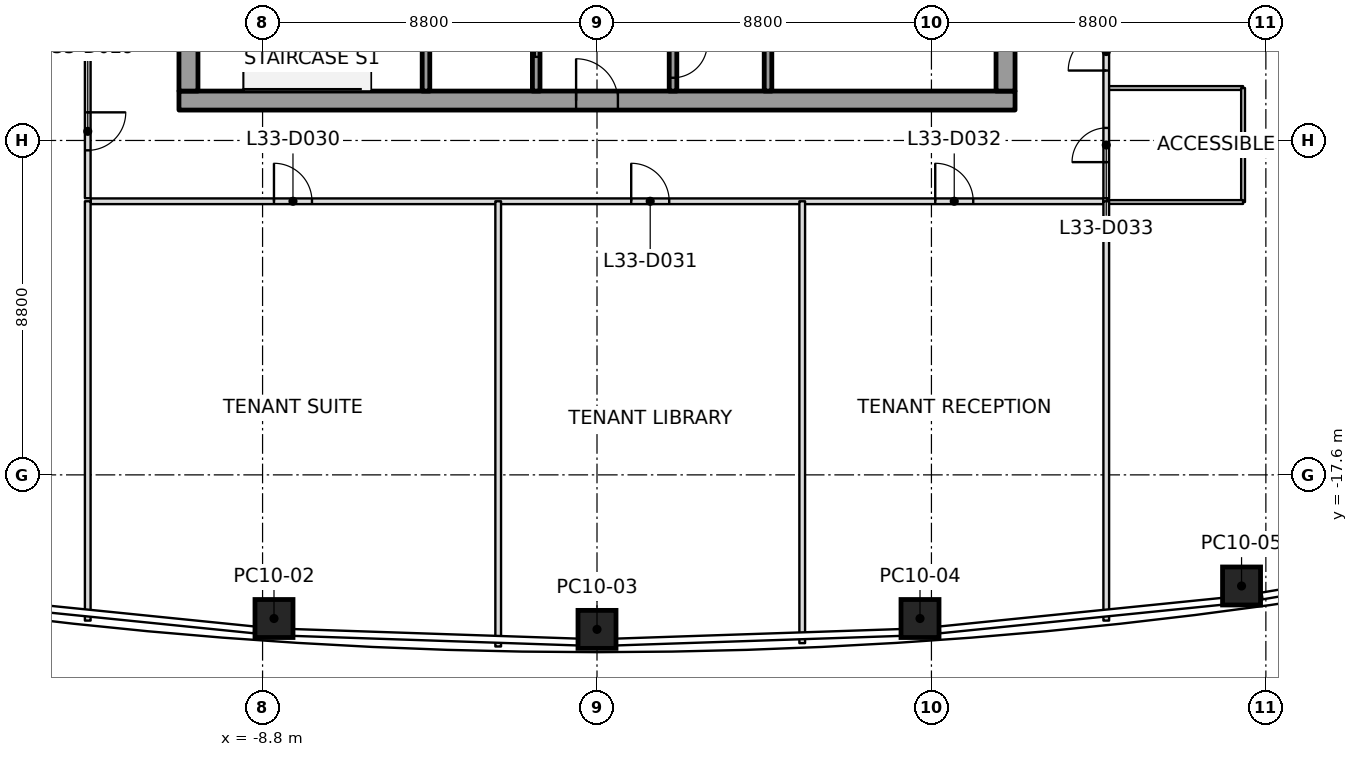
"""IFC4 building model, lengths in metres.
Left out: names, types, materials, properties, quantities, classifications, styles, units other than length and angle.
Written with IfcOpenShell. Run it as: python <this file> out.ifc"""

import sys

from ifc_helpers import new_model, si_unit, direction, frame, frame_2d, origin, origin_2d, place, context, subcontext, project, spatial, rectangle, extrude, element, fill, save


model = new_model("IFC4")
c1 = context("Model", 3, precision=1e-05, world=origin(), true_north=direction((0.0, 1.0)))
c2 = subcontext(c1, "Body", "Model", "MODEL_VIEW")
j1 = project(units=[si_unit("LENGTHUNIT", "METRE"), si_unit("PLANEANGLEUNIT", "RADIAN")], contexts=[c1])
p1 = place(None, origin())
s1 = spatial("IfcSite", under=j1, at=p1, CompositionType="ELEMENT")
p2 = place(p1, origin())
s2 = spatial("IfcBuilding", under=s1, at=p2, CompositionType="ELEMENT")
p3 = place(p2, frame((0.0, 0.0, 153.8)))
s3 = spatial("IfcBuildingStorey", under=s2, at=p3, CompositionType="ELEMENT", Elevation=153.8)
p4 = place(p3, frame((-8.499, -21.38, 0.0), z_axis=(0.008849199152, 0.01116829962, 0.999898475225), x_axis=(-0.997701725357, 0.0672756111, 0.008078327231)))
e1 = element("IfcColumn", 1, at=p4, inside=s3, PredefinedType="COLUMN", context=c2, shape_type="SweptSolid", body=[
    extrude(rectangle(XDim=1.0, YDim=1.0, at=origin_2d()), origin(), (0.0, 0.0, 1.0), 4.0),
])
p5 = place(p3, frame((0.0, -21.666, 0.0), z_axis=(0.0, 0.01141283087, 0.999934871525), x_axis=(1.0, 0.0, 0.0)))
e2 = element("IfcColumn", 2, at=p5, inside=s3, PredefinedType="COLUMN", context=c2, shape_type="SweptSolid", body=[
    extrude(rectangle(XDim=1.0, YDim=1.0, at=origin_2d()), origin(), (0.0, 0.0, 1.0), 4.0),
])
p6 = place(p3, frame((8.499, -21.38, 0.0), z_axis=(-0.008849199152, 0.01116829962, 0.999898475225), x_axis=(0.997701725357, 0.0672756111, 0.008078327231)))
e3 = element("IfcColumn", 3, at=p6, inside=s3, PredefinedType="COLUMN", context=c2, shape_type="SweptSolid", body=[
    extrude(rectangle(XDim=1.0, YDim=1.0, at=origin_2d()), origin(), (0.0, 0.0, 1.0), 4.0),
])
p7 = place(p3, frame((16.96, -20.524, 0.0), z_axis=(-0.017696459735, 0.010434809016, 0.999788952766), x_axis=(0.990818194268, 0.134234547911, 0.016136668008)))
e4 = element("IfcColumn", 4, at=p7, inside=s3, PredefinedType="COLUMN", context=c2, shape_type="SweptSolid", body=[
    extrude(rectangle(XDim=1.0, YDim=1.0, at=origin_2d()), origin(), (0.0, 0.0, 1.0), 4.001),
])
p8 = place(p3, frame((-11.0, -7.75, 0.0), z_axis=(0.0, 0.0, 1.0), x_axis=(1.0, 0.0, 0.0)))
e5 = element("IfcWall", 5, at=p8, inside=s3, PredefinedType="SHEAR", context=c2, shape_type="SweptSolid", body=[
    extrude(rectangle(XDim=22.0, YDim=0.5, at=frame_2d((11.0, 0.0))), origin(), (0.0, 0.0, 1.0), 4.0),
])
p9 = place(p8, frame((10.45, 0.0, 0.0)))
e6 = element("IfcOpeningElement", 6, at=p9, cuts=e5, PredefinedType="OPENING", context=c2, shape_type="SweptSolid", body=[
    extrude(rectangle(XDim=1.1, YDim=2.1, at=frame_2d((0.55, 1.05))), frame((0.0, 0.25, 0.0), z_axis=(0.0, -1.0, 0.0), x_axis=(1.0, 0.0, 0.0)), (0.0, 0.0, 1.0), 0.5),
])
p10 = place(p3, frame((-10.75, -7.5, 0.0), z_axis=(0.0, 0.0, 1.0), x_axis=(0.0, 1.0, 0.0)))
e7 = element("IfcWall", 7, at=p10, inside=s3, PredefinedType="SHEAR", context=c2, shape_type="SweptSolid", body=[
    extrude(rectangle(XDim=15.0, YDim=0.5, at=frame_2d((7.5, 0.0))), origin(), (0.0, 0.0, 1.0), 4.0),
])
p11 = place(p10, frame((6.6, 0.0, 0.0)))
e8 = element("IfcOpeningElement", 8, at=p11, cuts=e7, PredefinedType="OPENING", context=c2, shape_type="SweptSolid", body=[
    extrude(rectangle(XDim=1.8, YDim=2.1, at=frame_2d((0.9, 1.05))), frame((0.0, 0.25, 0.0), z_axis=(0.0, -1.0, 0.0), x_axis=(1.0, 0.0, 0.0)), (0.0, 0.0, 1.0), 0.5),
])
p12 = place(p3, frame((10.75, -7.5, 0.0), z_axis=(0.0, 0.0, 1.0), x_axis=(0.0, 1.0, 0.0)))
e9 = element("IfcWall", 9, at=p12, inside=s3, PredefinedType="SHEAR", context=c2, shape_type="SweptSolid", body=[
    extrude(rectangle(XDim=15.0, YDim=0.5, at=frame_2d((7.5, 0.0))), origin(), (0.0, 0.0, 1.0), 4.0),
])
p13 = place(p12, frame((6.6, 0.0, 0.0)))
e10 = element("IfcOpeningElement", 10, at=p13, cuts=e9, PredefinedType="OPENING", context=c2, shape_type="SweptSolid", body=[
    extrude(rectangle(XDim=1.8, YDim=2.1, at=frame_2d((0.9, 1.05))), frame((0.0, 0.25, 0.0), z_axis=(0.0, -1.0, 0.0), x_axis=(1.0, 0.0, 0.0)), (0.0, 0.0, 1.0), 0.5),
])
p14 = place(p3, frame((-4.5, -4.6, 0.0), z_axis=(0.0, 0.0, 1.0), x_axis=(0.0, -1.0, 0.0)))
e11 = element("IfcWall", 11, at=p14, inside=s3, PredefinedType="SOLIDWALL", context=c2, shape_type="SweptSolid", body=[
    extrude(rectangle(XDim=2.9, YDim=0.2, at=frame_2d((1.45, 0.0))), origin(), (0.0, 0.0, 1.0), 3.85),
])
p15 = place(p3, frame((-1.6, -7.5, 0.0), z_axis=(0.0, 0.0, 1.0), x_axis=(0.0, 1.0, 0.0)))
e12 = element("IfcWall", 12, at=p15, inside=s3, PredefinedType="SOLIDWALL", context=c2, shape_type="SweptSolid", body=[
    extrude(rectangle(XDim=2.9, YDim=0.2, at=frame_2d((1.45, 0.0))), origin(), (0.0, 0.0, 1.0), 3.85),
])
p16 = place(p15, frame((0.9, 0.0, 0.0)))
e13 = element("IfcOpeningElement", 13, at=p16, cuts=e12, PredefinedType="OPENING", context=c2, shape_type="SweptSolid", body=[
    extrude(rectangle(XDim=1.1, YDim=2.1, at=frame_2d((0.55, 1.05))), frame((0.0, 0.1, 0.0), z_axis=(0.0, -1.0, 0.0), x_axis=(1.0, 0.0, 0.0)), (0.0, 0.0, 1.0), 0.2),
])
p17 = place(p3, frame((2.0, -5.9, 0.0), z_axis=(0.0, 0.0, 1.0), x_axis=(0.0, -1.0, 0.0)))
e14 = element("IfcWall", 14, at=p17, inside=s3, PredefinedType="SOLIDWALL", context=c2, shape_type="SweptSolid", body=[
    extrude(rectangle(XDim=1.6, YDim=0.2, at=frame_2d((0.8, 0.0))), origin(), (0.0, 0.0, 1.0), 3.85),
])
p18 = place(p17, frame((0.35, 0.0, 0.0)))
e15 = element("IfcOpeningElement", 15, at=p18, cuts=e14, PredefinedType="OPENING", context=c2, shape_type="SweptSolid", body=[
    extrude(rectangle(XDim=0.9, YDim=2.1, at=frame_2d((0.45, 1.05))), frame((0.0, 0.1, 0.0), z_axis=(0.0, -1.0, 0.0), x_axis=(1.0, 0.0, 0.0)), (0.0, 0.0, 1.0), 0.2),
])
p19 = place(p3, frame((4.5, -5.9, 0.0), z_axis=(0.0, 0.0, 1.0), x_axis=(0.0, -1.0, 0.0)))
e16 = element("IfcWall", 16, at=p19, inside=s3, PredefinedType="SOLIDWALL", context=c2, shape_type="SweptSolid", body=[
    extrude(rectangle(XDim=1.6, YDim=0.2, at=frame_2d((0.8, 0.0))), origin(), (0.0, 0.0, 1.0), 3.85),
])
p20 = place(p3, frame((-13.4, -10.4, 0.0), z_axis=(0.0, 0.0, 1.0), x_axis=(0.0, -1.0, 0.0)))
e17 = element("IfcWall", 17, at=p20, inside=s3, PredefinedType="PARTITIONING", context=c2, shape_type="SweptSolid", body=[
    extrude(rectangle(XDim=11.034, YDim=0.15, at=frame_2d((5.517, 0.0))), origin(), (0.0, 0.0, 1.0), 3.234),
])
p21 = place(p3, frame((-2.6, -10.4, 0.0), z_axis=(0.0, 0.0, 1.0), x_axis=(0.0, -1.0, 0.0)))
e18 = element("IfcWall", 18, at=p21, inside=s3, PredefinedType="PARTITIONING", context=c2, shape_type="SweptSolid", body=[
    extrude(rectangle(XDim=11.716, YDim=0.15, at=frame_2d((5.858, 0.0))), origin(), (0.0, 0.0, 1.0), 3.234),
])
p22 = place(p3, frame((5.4, -10.4, 0.0), z_axis=(0.0, 0.0, 1.0), x_axis=(0.0, -1.0, 0.0)))
e19 = element("IfcWall", 19, at=p22, inside=s3, PredefinedType="PARTITIONING", context=c2, shape_type="SweptSolid", body=[
    extrude(rectangle(XDim=11.628, YDim=0.15, at=frame_2d((5.814, 0.0))), origin(), (0.0, 0.0, 1.0), 3.234),
])
p23 = place(p3, frame((13.4, -10.4, 0.0), z_axis=(0.0, 0.0, 1.0), x_axis=(0.0, -1.0, 0.0)))
e20 = element("IfcWall", 20, at=p23, inside=s3, PredefinedType="PARTITIONING", context=c2, shape_type="SweptSolid", body=[
    extrude(rectangle(XDim=11.034, YDim=0.15, at=frame_2d((5.517, 0.0))), origin(), (0.0, 0.0, 1.0), 3.234),
])
p24 = place(p3, frame((-13.4, 10.32, 0.0), z_axis=(0.0, 0.0, 1.0), x_axis=(0.0, -1.0, 0.0)))
e21 = element("IfcWall", 21, at=p24, inside=s3, PredefinedType="PARTITIONING", context=c2, shape_type="SweptSolid", body=[
    extrude(rectangle(XDim=20.64, YDim=0.15, at=frame_2d((10.32, 0.0))), origin(), (0.0, 0.0, 1.0), 3.166),
])
p25 = place(p24, frame((5.82, 0.0, 0.0)))
e22 = element("IfcOpeningElement", 22, at=p25, cuts=e21, PredefinedType="OPENING", context=c2, shape_type="SweptSolid", body=[
    extrude(rectangle(XDim=1.0, YDim=2.1, at=frame_2d((0.5, 1.05))), frame((0.0, 0.075, 0.0), z_axis=(0.0, -1.0, 0.0), x_axis=(1.0, 0.0, 0.0)), (0.0, 0.0, 1.0), 0.15),
])
p26 = place(p24, frame((14.37, 0.0, 0.0)))
e23 = element("IfcOpeningElement", 23, at=p26, cuts=e21, PredefinedType="OPENING", context=c2, shape_type="SweptSolid", body=[
    extrude(rectangle(XDim=0.9, YDim=2.1, at=frame_2d((0.45, 1.05))), frame((0.0, 0.075, 0.0), z_axis=(0.0, -1.0, 0.0), x_axis=(1.0, 0.0, 0.0)), (0.0, 0.0, 1.0), 0.15),
])
p27 = place(p24, frame((18.38, 0.0, 0.0)))
e24 = element("IfcOpeningElement", 24, at=p27, cuts=e21, PredefinedType="OPENING", context=c2, shape_type="SweptSolid", body=[
    extrude(rectangle(XDim=1.0, YDim=2.1, at=frame_2d((0.5, 1.05))), frame((0.0, 0.075, 0.0), z_axis=(0.0, -1.0, 0.0), x_axis=(1.0, 0.0, 0.0)), (0.0, 0.0, 1.0), 0.15),
])
p28 = place(p3, frame((-13.32, -10.4, 0.0), z_axis=(0.0, 0.0, 1.0), x_axis=(1.0, 0.0, 0.0)))
e25 = element("IfcWall", 25, at=p28, inside=s3, PredefinedType="PARTITIONING", context=c2, shape_type="SweptSolid", body=[
    extrude(rectangle(XDim=26.64, YDim=0.15, at=frame_2d((13.32, 0.0))), origin(), (0.0, 0.0, 1.0), 3.3),
])
p29 = place(p28, frame((4.82, 0.0, 0.0)))
e26 = element("IfcOpeningElement", 26, at=p29, cuts=e25, PredefinedType="OPENING", context=c2, shape_type="SweptSolid", body=[
    extrude(rectangle(XDim=1.0, YDim=2.1, at=frame_2d((0.5, 1.05))), frame((0.0, 0.075, 0.0), z_axis=(0.0, -1.0, 0.0), x_axis=(1.0, 0.0, 0.0)), (0.0, 0.0, 1.0), 0.15),
])
p30 = place(p28, frame((14.22, 0.0, 0.0)))
e27 = element("IfcOpeningElement", 27, at=p30, cuts=e25, PredefinedType="OPENING", context=c2, shape_type="SweptSolid", body=[
    extrude(rectangle(XDim=1.0, YDim=2.1, at=frame_2d((0.5, 1.05))), frame((0.0, 0.075, 0.0), z_axis=(0.0, -1.0, 0.0), x_axis=(1.0, 0.0, 0.0)), (0.0, 0.0, 1.0), 0.15),
])
p31 = place(p28, frame((22.22, 0.0, 0.0)))
e28 = element("IfcOpeningElement", 28, at=p31, cuts=e25, PredefinedType="OPENING", context=c2, shape_type="SweptSolid", body=[
    extrude(rectangle(XDim=1.0, YDim=2.1, at=frame_2d((0.5, 1.05))), frame((0.0, 0.075, 0.0), z_axis=(0.0, -1.0, 0.0), x_axis=(1.0, 0.0, 0.0)), (0.0, 0.0, 1.0), 0.15),
])
p32 = place(p3, frame((13.4, -10.32, 0.0), z_axis=(0.0, 0.0, 1.0), x_axis=(0.0, 1.0, 0.0)))
e29 = element("IfcWall", 29, at=p32, inside=s3, PredefinedType="PARTITIONING", context=c2, shape_type="SweptSolid", body=[
    extrude(rectangle(XDim=20.64, YDim=0.15, at=frame_2d((10.32, 0.0))), origin(), (0.0, 0.0, 1.0), 3.166),
])
p33 = place(p32, frame((16.22, 0.0, 0.0)))
e30 = element("IfcOpeningElement", 30, at=p33, cuts=e29, PredefinedType="OPENING", context=c2, shape_type="SweptSolid", body=[
    extrude(rectangle(XDim=1.0, YDim=2.1, at=frame_2d((0.5, 1.05))), frame((0.0, 0.075, 0.0), z_axis=(0.0, -1.0, 0.0), x_axis=(1.0, 0.0, 0.0)), (0.0, 0.0, 1.0), 0.15),
])
p34 = place(p32, frame((0.95, 0.0, 0.0)))
e31 = element("IfcOpeningElement", 31, at=p34, cuts=e29, PredefinedType="OPENING", context=c2, shape_type="SweptSolid", body=[
    extrude(rectangle(XDim=0.9, YDim=2.1, at=frame_2d((0.45, 1.05))), frame((0.0, 0.075, 0.0), z_axis=(0.0, -1.0, 0.0), x_axis=(1.0, 0.0, 0.0)), (0.0, 0.0, 1.0), 0.15),
])
p35 = place(p32, frame((3.36, 0.0, 0.0)))
e32 = element("IfcOpeningElement", 32, at=p35, cuts=e29, PredefinedType="OPENING", context=c2, shape_type="SweptSolid", body=[
    extrude(rectangle(XDim=1.0, YDim=2.1, at=frame_2d((0.5, 1.05))), frame((0.0, 0.075, 0.0), z_axis=(0.0, -1.0, 0.0), x_axis=(1.0, 0.0, 0.0)), (0.0, 0.0, 1.0), 0.15),
])
p36 = place(p32, frame((8.22, 0.0, 0.0)))
e33 = element("IfcOpeningElement", 33, at=p36, cuts=e29, PredefinedType="OPENING", context=c2, shape_type="SweptSolid", body=[
    extrude(rectangle(XDim=1.0, YDim=2.1, at=frame_2d((0.5, 1.05))), frame((0.0, 0.075, 0.0), z_axis=(0.0, -1.0, 0.0), x_axis=(1.0, 0.0, 0.0)), (0.0, 0.0, 1.0), 0.15),
])
p37 = place(p3, frame((-13.43, -6.6, 0.0), z_axis=(0.0, 0.0, 1.0), x_axis=(-1.0, 0.0, 0.0)))
e34 = element("IfcWall", 34, at=p37, inside=s3, PredefinedType="PARTITIONING", context=c2, shape_type="SweptSolid", body=[
    extrude(rectangle(XDim=4.97, YDim=0.1, at=frame_2d((2.485, 0.0))), origin(), (0.0, 0.0, 1.0), 3.247),
])
p38 = place(p3, frame((13.43, -7.42, 0.0), z_axis=(0.0, 0.0, 1.0), x_axis=(1.0, 0.0, 0.0)))
e35 = element("IfcWall", 35, at=p38, inside=s3, PredefinedType="PARTITIONING", context=c2, shape_type="SweptSolid", body=[
    extrude(rectangle(XDim=3.57, YDim=0.1, at=frame_2d((1.785, 0.0))), origin(), (0.0, 0.0, 1.0), 3.3),
])
p39 = place(p3, frame((17.0, -7.42, 0.0), z_axis=(0.0, 0.0, 1.0), x_axis=(0.0, -1.0, 0.0)))
e36 = element("IfcWall", 36, at=p39, inside=s3, PredefinedType="PARTITIONING", context=c2, shape_type="SweptSolid", body=[
    extrude(rectangle(XDim=3.0, YDim=0.1, at=frame_2d((1.5, 0.0))), origin(), (0.0, 0.0, 1.0), 3.3),
])
p40 = place(p3, frame((17.0, -10.42, 0.0), z_axis=(0.0, 0.0, 1.0), x_axis=(-1.0, 0.0, 0.0)))
e37 = element("IfcWall", 37, at=p40, inside=s3, PredefinedType="PARTITIONING", context=c2, shape_type="SweptSolid", body=[
    extrude(rectangle(XDim=3.57, YDim=0.1, at=frame_2d((1.785, 0.0))), origin(), (0.0, 0.0, 1.0), 3.166),
])
p41 = place(p27, origin())
e38 = element("IfcDoor", 38, at=p41, inside=s3, OperationType="SINGLE_SWING_LEFT", PredefinedType="DOOR", context=c2, shape_type="SweptSolid", body=[
    extrude(rectangle(XDim=1.0, YDim=2.1, at=frame_2d((0.5, 1.05))), frame((0.0, 0.025, 0.0), z_axis=(0.0, -1.0, 0.0), x_axis=(1.0, 0.0, 0.0)), (0.0, 0.0, 1.0), 0.05),
])
fill(e24, e38)
p42 = place(p29, origin())
e39 = element("IfcDoor", 39, at=p42, inside=s3, OperationType="SINGLE_SWING_LEFT", PredefinedType="DOOR", context=c2, shape_type="SweptSolid", body=[
    extrude(rectangle(XDim=1.0, YDim=2.1, at=frame_2d((0.5, 1.05))), frame((0.0, 0.025, 0.0), z_axis=(0.0, -1.0, 0.0), x_axis=(1.0, 0.0, 0.0)), (0.0, 0.0, 1.0), 0.05),
])
fill(e26, e39)
p43 = place(p30, origin())
e40 = element("IfcDoor", 40, at=p43, inside=s3, OperationType="SINGLE_SWING_LEFT", PredefinedType="DOOR", context=c2, shape_type="SweptSolid", body=[
    extrude(rectangle(XDim=1.0, YDim=2.1, at=frame_2d((0.5, 1.05))), frame((0.0, 0.025, 0.0), z_axis=(0.0, -1.0, 0.0), x_axis=(1.0, 0.0, 0.0)), (0.0, 0.0, 1.0), 0.05),
])
fill(e27, e40)
p44 = place(p31, origin())
e41 = element("IfcDoor", 41, at=p44, inside=s3, OperationType="SINGLE_SWING_LEFT", PredefinedType="DOOR", context=c2, shape_type="SweptSolid", body=[
    extrude(rectangle(XDim=1.0, YDim=2.1, at=frame_2d((0.5, 1.05))), frame((0.0, 0.025, 0.0), z_axis=(0.0, -1.0, 0.0), x_axis=(1.0, 0.0, 0.0)), (0.0, 0.0, 1.0), 0.05),
])
fill(e28, e41)
p45 = place(p34, origin())
e42 = element("IfcDoor", 42, at=p45, inside=s3, OperationType="SINGLE_SWING_LEFT", PredefinedType="DOOR", context=c2, shape_type="SweptSolid", body=[
    extrude(rectangle(XDim=0.9, YDim=2.1, at=frame_2d((0.45, 1.05))), frame((0.0, 0.025, 0.0), z_axis=(0.0, -1.0, 0.0), x_axis=(1.0, 0.0, 0.0)), (0.0, 0.0, 1.0), 0.05),
])
fill(e31, e42)
p46 = place(p35, origin())
e43 = element("IfcDoor", 43, at=p46, inside=s3, OperationType="SINGLE_SWING_RIGHT", PredefinedType="DOOR", context=c2, shape_type="SweptSolid", body=[
    extrude(rectangle(XDim=1.0, YDim=2.1, at=frame_2d((0.5, 1.05))), frame((0.0, 0.025, 0.0), z_axis=(0.0, -1.0, 0.0), x_axis=(1.0, 0.0, 0.0)), (0.0, 0.0, 1.0), 0.05),
])
fill(e32, e43)
p47 = place(p16, origin())
e44 = element("IfcDoor", 44, at=p47, inside=s3, OperationType="SLIDING_TO_RIGHT", PredefinedType="DOOR", context=c2, shape_type="SweptSolid", body=[
    extrude(rectangle(XDim=1.1, YDim=2.1, at=frame_2d((0.55, 1.05))), frame((0.0, 0.025, 0.0), z_axis=(0.0, -1.0, 0.0), x_axis=(1.0, 0.0, 0.0)), (0.0, 0.0, 1.0), 0.05),
])
fill(e13, e44)
p48 = place(p18, origin())
e45 = element("IfcDoor", 45, at=p48, inside=s3, OperationType="SINGLE_SWING_RIGHT", PredefinedType="DOOR", context=c2, shape_type="SweptSolid", body=[
    extrude(rectangle(XDim=0.9, YDim=2.1, at=frame_2d((0.45, 1.05))), frame((0.0, 0.025, 0.0), z_axis=(0.0, -1.0, 0.0), x_axis=(1.0, 0.0, 0.0)), (0.0, 0.0, 1.0), 0.05),
])
fill(e15, e45)
p49 = place(p9, origin())
e46 = element("IfcDoor", 46, at=p49, inside=s3, OperationType="SINGLE_SWING_RIGHT", PredefinedType="DOOR", context=c2, shape_type="SweptSolid", body=[
    extrude(rectangle(XDim=1.1, YDim=2.1, at=frame_2d((0.55, 1.05))), frame((0.0, 0.025, 0.0), z_axis=(0.0, -1.0, 0.0), x_axis=(1.0, 0.0, 0.0)), (0.0, 0.0, 1.0), 0.05),
])
fill(e6, e46)
save(model, sys.argv[1])
